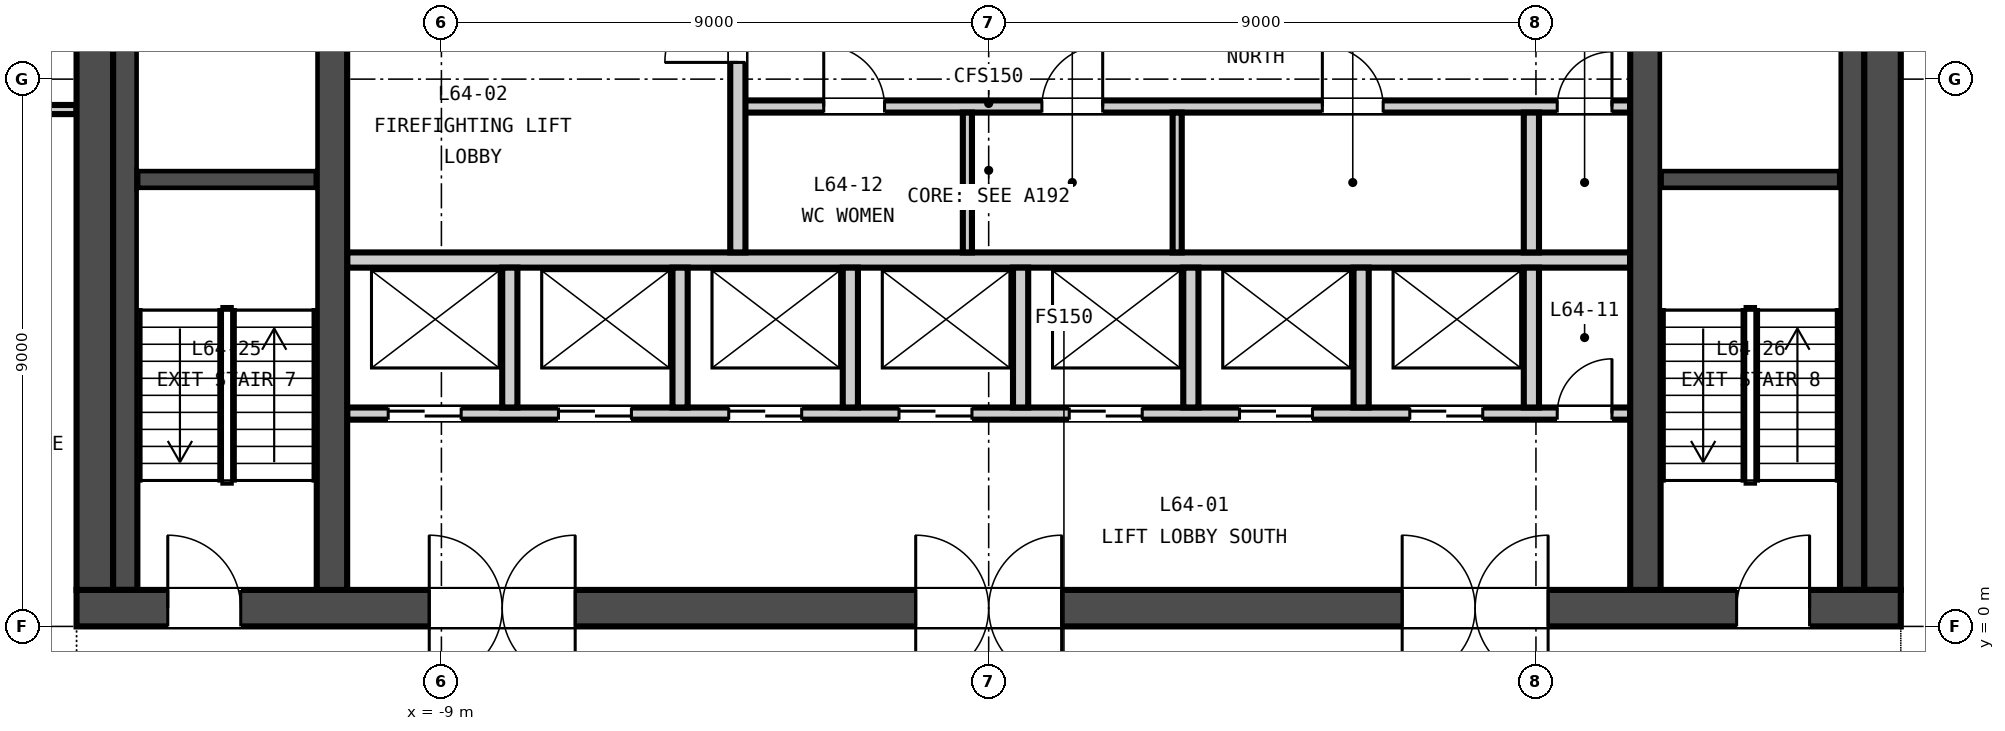
"""IFC4 building model, lengths in metres.
Left out: names, types, materials, properties, quantities, classifications, styles, units other than length and angle.
Written with IfcOpenShell. Run it as: python <this file> out.ifc"""

import sys

from ifc_helpers import new_model, si_unit, direction, frame, frame_2d, origin, place, context, subcontext, project, spatial, rectangle, extrude, element, fill, save


model = new_model("IFC4")
c1 = context("Model", 3, precision=1e-05, world=origin(), true_north=direction((0.0, 1.0)))
c2 = subcontext(c1, "Body", "Model", "MODEL_VIEW")
j1 = project(units=[si_unit("LENGTHUNIT", "METRE"), si_unit("PLANEANGLEUNIT", "RADIAN")], contexts=[c1])
p1 = place(None, origin())
s1 = spatial("IfcSite", under=j1, at=p1, CompositionType="ELEMENT")
p2 = place(p1, origin())
s2 = spatial("IfcBuilding", under=s1, at=p2, CompositionType="ELEMENT")
p3 = place(p2, frame((0.0, 0.0, 252.8)))
s3 = spatial("IfcBuildingStorey", under=s2, at=p3, CompositionType="ELEMENT", Elevation=252.8)
p4 = place(p3, frame((-15.0, 0.3, -0.15), z_axis=(0.0, 0.0, 1.0), x_axis=(1.0, 0.0, 0.0)))
e1 = element("IfcWall", 1, at=p4, inside=s3, PredefinedType="SOLIDWALL", context=c2, shape_type="SweptSolid", body=[
    extrude(rectangle(XDim=30.0, YDim=0.6, at=frame_2d((15.0, 0.0))), origin(), (0.0, 0.0, 1.0), 3.5),
])
p5 = place(p4, frame((5.8, 0.0, 0.15)))
e2 = element("IfcOpeningElement", 2, at=p5, cuts=e1, PredefinedType="OPENING", context=c2, shape_type="SweptSolid", body=[
    extrude(rectangle(XDim=2.4, YDim=2.4, at=frame_2d((1.2, 1.2))), frame((0.0, 0.31, 0.0), z_axis=(0.0, -1.0, 0.0), x_axis=(1.0, 0.0, 0.0)), (0.0, 0.0, 1.0), 0.62),
])
p6 = place(p4, frame((13.8, 0.0, 0.15)))
e3 = element("IfcOpeningElement", 3, at=p6, cuts=e1, PredefinedType="OPENING", context=c2, shape_type="SweptSolid", body=[
    extrude(rectangle(XDim=2.4, YDim=2.4, at=frame_2d((1.2, 1.2))), frame((0.0, 0.31, 0.0), z_axis=(0.0, -1.0, 0.0), x_axis=(1.0, 0.0, 0.0)), (0.0, 0.0, 1.0), 0.62),
])
p7 = place(p4, frame((21.8, 0.0, 0.15)))
e4 = element("IfcOpeningElement", 4, at=p7, cuts=e1, PredefinedType="OPENING", context=c2, shape_type="SweptSolid", body=[
    extrude(rectangle(XDim=2.4, YDim=2.4, at=frame_2d((1.2, 1.2))), frame((0.0, 0.31, 0.0), z_axis=(0.0, -1.0, 0.0), x_axis=(1.0, 0.0, 0.0)), (0.0, 0.0, 1.0), 0.62),
])
p8 = place(p4, frame((1.5, 0.0, 0.15)))
e5 = element("IfcOpeningElement", 5, at=p8, cuts=e1, PredefinedType="OPENING", context=c2, shape_type="SweptSolid", body=[
    extrude(rectangle(XDim=1.2, YDim=2.1, at=frame_2d((0.6, 1.05))), frame((0.0, 0.31, 0.0), z_axis=(0.0, -1.0, 0.0), x_axis=(1.0, 0.0, 0.0)), (0.0, 0.0, 1.0), 0.62),
])
p9 = place(p4, frame((27.3, 0.0, 0.15)))
e6 = element("IfcOpeningElement", 6, at=p9, cuts=e1, PredefinedType="OPENING", context=c2, shape_type="SweptSolid", body=[
    extrude(rectangle(XDim=1.2, YDim=2.1, at=frame_2d((0.6, 1.05))), frame((0.0, 0.31, 0.0), z_axis=(0.0, -1.0, 0.0), x_axis=(1.0, 0.0, 0.0)), (0.0, 0.0, 1.0), 0.62),
])
for number, where, z_axis, x_axis in (
    (7, (-14.7, 0.6, -0.15), (0.0, 0.0, 1.0), (0.0, 1.0, 0.0)),
    (8, (14.7, 0.6, -0.15), (0.0, 0.0, 1.0), (0.0, 1.0, 0.0)),
):
    element("IfcWall", number, at=place(p3, frame(where, z_axis=z_axis, x_axis=x_axis)), inside=s3, PredefinedType="SOLIDWALL", context=c2, shape_type="SweptSolid", body=[
        extrude(rectangle(XDim=13.8, YDim=0.6, at=frame_2d((6.9, 0.0))), origin(), (0.0, 0.0, 1.0), 3.5),
    ])
for number, where, z_axis, x_axis in (
    (9, (-10.8, 0.6, -0.15), (0.0, 0.0, 1.0), (0.0, 1.0, 0.0)),
    (10, (10.8, 0.6, -0.15), (0.0, 0.0, 1.0), (0.0, 1.0, 0.0)),
):
    element("IfcWall", number, at=place(p3, frame(where, z_axis=z_axis, x_axis=x_axis)), inside=s3, PredefinedType="SOLIDWALL", context=c2, shape_type="SweptSolid", body=[
        extrude(rectangle(XDim=13.8, YDim=0.5, at=frame_2d((6.9, 0.0))), origin(), (0.0, 0.0, 1.0), 3.5),
    ])
p10 = place(p3, frame((-10.55, 3.5, 0.0), z_axis=(0.0, 0.0, 1.0), x_axis=(1.0, 0.0, 0.0)))
e11 = element("IfcWall", 11, at=p10, inside=s3, PredefinedType="PARTITIONING", context=c2, shape_type="SweptSolid", body=[
    extrude(rectangle(XDim=21.1, YDim=0.2, at=frame_2d((10.55, 0.0))), origin(), (0.0, 0.0, 1.0), 3.35),
])
p11 = place(p10, frame((0.675, 0.0, 0.0)))
e12 = element("IfcOpeningElement", 12, at=p11, cuts=e11, PredefinedType="OPENING", context=c2, shape_type="SweptSolid", body=[
    extrude(rectangle(XDim=1.2, YDim=2.1, at=frame_2d((0.6, 1.05))), frame((0.0, 0.11, 0.0), z_axis=(0.0, -1.0, 0.0), x_axis=(1.0, 0.0, 0.0)), (0.0, 0.0, 1.0), 0.22),
])
p12 = place(p10, frame((3.475, 0.0, 0.0)))
e13 = element("IfcOpeningElement", 13, at=p12, cuts=e11, PredefinedType="OPENING", context=c2, shape_type="SweptSolid", body=[
    extrude(rectangle(XDim=1.2, YDim=2.1, at=frame_2d((0.6, 1.05))), frame((0.0, 0.11, 0.0), z_axis=(0.0, -1.0, 0.0), x_axis=(1.0, 0.0, 0.0)), (0.0, 0.0, 1.0), 0.22),
])
p13 = place(p10, frame((6.275, 0.0, 0.0)))
e14 = element("IfcOpeningElement", 14, at=p13, cuts=e11, PredefinedType="OPENING", context=c2, shape_type="SweptSolid", body=[
    extrude(rectangle(XDim=1.2, YDim=2.1, at=frame_2d((0.6, 1.05))), frame((0.0, 0.11, 0.0), z_axis=(0.0, -1.0, 0.0), x_axis=(1.0, 0.0, 0.0)), (0.0, 0.0, 1.0), 0.22),
])
p14 = place(p10, frame((9.075, 0.0, 0.0)))
e15 = element("IfcOpeningElement", 15, at=p14, cuts=e11, PredefinedType="OPENING", context=c2, shape_type="SweptSolid", body=[
    extrude(rectangle(XDim=1.2, YDim=2.1, at=frame_2d((0.6, 1.05))), frame((0.0, 0.11, 0.0), z_axis=(0.0, -1.0, 0.0), x_axis=(1.0, 0.0, 0.0)), (0.0, 0.0, 1.0), 0.22),
])
p15 = place(p10, frame((11.875, 0.0, 0.0)))
e16 = element("IfcOpeningElement", 16, at=p15, cuts=e11, PredefinedType="OPENING", context=c2, shape_type="SweptSolid", body=[
    extrude(rectangle(XDim=1.2, YDim=2.1, at=frame_2d((0.6, 1.05))), frame((0.0, 0.11, 0.0), z_axis=(0.0, -1.0, 0.0), x_axis=(1.0, 0.0, 0.0)), (0.0, 0.0, 1.0), 0.22),
])
p16 = place(p10, frame((14.675, 0.0, 0.0)))
e17 = element("IfcOpeningElement", 17, at=p16, cuts=e11, PredefinedType="OPENING", context=c2, shape_type="SweptSolid", body=[
    extrude(rectangle(XDim=1.2, YDim=2.1, at=frame_2d((0.6, 1.05))), frame((0.0, 0.11, 0.0), z_axis=(0.0, -1.0, 0.0), x_axis=(1.0, 0.0, 0.0)), (0.0, 0.0, 1.0), 0.22),
])
p17 = place(p10, frame((17.475, 0.0, 0.0)))
e18 = element("IfcOpeningElement", 18, at=p17, cuts=e11, PredefinedType="OPENING", context=c2, shape_type="SweptSolid", body=[
    extrude(rectangle(XDim=1.2, YDim=2.1, at=frame_2d((0.6, 1.05))), frame((0.0, 0.11, 0.0), z_axis=(0.0, -1.0, 0.0), x_axis=(1.0, 0.0, 0.0)), (0.0, 0.0, 1.0), 0.22),
])
p18 = place(p10, frame((19.9, 0.0, 0.0)))
e19 = element("IfcOpeningElement", 19, at=p18, cuts=e11, PredefinedType="OPENING", context=c2, shape_type="SweptSolid", body=[
    extrude(rectangle(XDim=0.9, YDim=2.1, at=frame_2d((0.45, 1.05))), frame((0.0, 0.11, 0.0), z_axis=(0.0, -1.0, 0.0), x_axis=(1.0, 0.0, 0.0)), (0.0, 0.0, 1.0), 0.22),
])
p19 = place(p3, frame((-10.55, 6.025, 0.0), z_axis=(0.0, 0.0, 1.0), x_axis=(1.0, 0.0, 0.0)))
e20 = element("IfcWall", 20, at=p19, inside=s3, PredefinedType="PARTITIONING", context=c2, shape_type="SweptSolid", body=[
    extrude(rectangle(XDim=21.1, YDim=0.25, at=frame_2d((10.55, 0.0))), origin(), (0.0, 0.0, 1.0), 3.35),
])
p20 = place(p3, frame((-4.125, 8.55, 0.0), z_axis=(0.0, 0.0, 1.0), x_axis=(1.0, 0.0, 0.0)))
e21 = element("IfcWall", 21, at=p20, inside=s3, PredefinedType="PARTITIONING", context=c2, shape_type="SweptSolid", body=[
    extrude(rectangle(XDim=14.675, YDim=0.2, at=frame_2d((7.337, 0.0))), origin(), (0.0, 0.0, 1.0), 3.35),
])
p21 = place(p20, frame((1.413, 0.0, 0.0)))
e22 = element("IfcOpeningElement", 22, at=p21, cuts=e21, PredefinedType="OPENING", context=c2, shape_type="SweptSolid", body=[
    extrude(rectangle(XDim=1.0, YDim=2.1, at=frame_2d((0.5, 1.05))), frame((0.0, 0.11, 0.0), z_axis=(0.0, -1.0, 0.0), x_axis=(1.0, 0.0, 0.0)), (0.0, 0.0, 1.0), 0.22),
])
p22 = place(p20, frame((5.0, 0.0, 0.0)))
e23 = element("IfcOpeningElement", 23, at=p22, cuts=e21, PredefinedType="OPENING", context=c2, shape_type="SweptSolid", body=[
    extrude(rectangle(XDim=1.0, YDim=2.1, at=frame_2d((0.5, 1.05))), frame((0.0, 0.11, 0.0), z_axis=(0.0, -1.0, 0.0), x_axis=(1.0, 0.0, 0.0)), (0.0, 0.0, 1.0), 0.22),
])
p23 = place(p20, frame((9.613, 0.0, 0.0)))
e24 = element("IfcOpeningElement", 24, at=p23, cuts=e21, PredefinedType="OPENING", context=c2, shape_type="SweptSolid", body=[
    extrude(rectangle(XDim=1.0, YDim=2.1, at=frame_2d((0.5, 1.05))), frame((0.0, 0.11, 0.0), z_axis=(0.0, -1.0, 0.0), x_axis=(1.0, 0.0, 0.0)), (0.0, 0.0, 1.0), 0.22),
])
p24 = place(p20, frame((13.475, 0.0, 0.0)))
e25 = element("IfcOpeningElement", 25, at=p24, cuts=e21, PredefinedType="OPENING", context=c2, shape_type="SweptSolid", body=[
    extrude(rectangle(XDim=0.9, YDim=2.1, at=frame_2d((0.45, 1.05))), frame((0.0, 0.11, 0.0), z_axis=(0.0, -1.0, 0.0), x_axis=(1.0, 0.0, 0.0)), (0.0, 0.0, 1.0), 0.22),
])
p25 = place(p3, frame((-4.125, 6.15, 0.0), z_axis=(0.0, 0.0, 1.0), x_axis=(0.0, 1.0, 0.0)))
e26 = element("IfcWall", 26, at=p25, inside=s3, PredefinedType="PARTITIONING", context=c2, shape_type="SweptSolid", body=[
    extrude(rectangle(XDim=4.95, YDim=0.25, at=frame_2d((2.475, 0.0))), origin(), (0.0, 0.0, 1.0), 3.35),
])
p26 = place(p25, frame((3.125, 0.0, 0.0)))
e27 = element("IfcOpeningElement", 27, at=p26, cuts=e26, PredefinedType="OPENING", context=c2, shape_type="SweptSolid", body=[
    extrude(rectangle(XDim=1.2, YDim=2.1, at=frame_2d((0.6, 1.05))), frame((0.0, 0.135, 0.0), z_axis=(0.0, -1.0, 0.0), x_axis=(1.0, 0.0, 0.0)), (0.0, 0.0, 1.0), 0.27),
])
for number, where, z_axis, x_axis in (
    (28, (-7.875, 3.6, 0.0), (0.0, 0.0, 1.0), (0.0, 1.0, 0.0)),
    (29, (-5.075, 3.6, 0.0), (0.0, 0.0, 1.0), (0.0, 1.0, 0.0)),
    (30, (-2.275, 3.6, 0.0), (0.0, 0.0, 1.0), (0.0, 1.0, 0.0)),
    (31, (0.525, 3.6, 0.0), (0.0, 0.0, 1.0), (0.0, 1.0, 0.0)),
    (32, (3.325, 3.6, 0.0), (0.0, 0.0, 1.0), (0.0, 1.0, 0.0)),
    (33, (6.125, 3.6, 0.0), (0.0, 0.0, 1.0), (0.0, 1.0, 0.0)),
    (34, (8.925, 3.6, 0.0), (0.0, 0.0, 1.0), (0.0, 1.0, 0.0)),
):
    element("IfcWall", number, at=place(p3, frame(where, z_axis=z_axis, x_axis=x_axis)), inside=s3, PredefinedType="PARTITIONING", context=c2, shape_type="SweptSolid", body=[
        extrude(rectangle(XDim=2.3, YDim=0.25, at=frame_2d((1.15, 0.0))), origin(), (0.0, 0.0, 1.0), 3.35),
    ])
for number, where, z_axis, x_axis in (
    (35, (-0.35, 6.15, 0.0), (0.0, 0.0, 1.0), (0.0, 1.0, 0.0)),
    (36, (3.1, 6.15, 0.0), (0.0, 0.0, 1.0), (0.0, 1.0, 0.0)),
):
    element("IfcWall", number, at=place(p3, frame(where, z_axis=z_axis, x_axis=x_axis)), inside=s3, PredefinedType="PARTITIONING", context=c2, shape_type="SweptSolid", body=[
        extrude(rectangle(XDim=2.3, YDim=0.15, at=frame_2d((1.15, 0.0))), origin(), (0.0, 0.0, 1.0), 3.35),
    ])
p27 = place(p3, frame((8.925, 6.15, 0.0), z_axis=(0.0, 0.0, 1.0), x_axis=(0.0, 1.0, 0.0)))
e37 = element("IfcWall", 37, at=p27, inside=s3, PredefinedType="PARTITIONING", context=c2, shape_type="SweptSolid", body=[
    extrude(rectangle(XDim=2.3, YDim=0.25, at=frame_2d((1.15, 0.0))), origin(), (0.0, 0.0, 1.0), 3.35),
])
p28 = place(p3, frame((-14.0, 7.35, 0.0), z_axis=(0.0, 0.0, 1.0), x_axis=(1.0, 0.0, 0.0)))
e38 = element("IfcWall", 38, at=p28, inside=s3, PredefinedType="SOLIDWALL", context=c2, shape_type="SweptSolid", body=[
    extrude(rectangle(XDim=2.95, YDim=0.3, at=frame_2d((1.475, 0.0))), origin(), (0.0, 0.0, 1.0), 3.35),
])
p29 = place(p3, frame((-14.2, 0.6, 0.0), z_axis=(0.0, 0.0, 1.0), x_axis=(0.0, 1.0, 0.0)))
e39 = element("IfcWall", 39, at=p29, inside=s3, PredefinedType="SOLIDWALL", context=c2, shape_type="SweptSolid", body=[
    extrude(rectangle(XDim=13.8, YDim=0.4, at=frame_2d((6.9, 0.0))), origin(), (0.0, 0.0, 1.0), 3.35),
])
p30 = place(p3, frame((11.05, 7.35, 0.0), z_axis=(0.0, 0.0, 1.0), x_axis=(1.0, 0.0, 0.0)))
e40 = element("IfcWall", 40, at=p30, inside=s3, PredefinedType="SOLIDWALL", context=c2, shape_type="SweptSolid", body=[
    extrude(rectangle(XDim=2.95, YDim=0.3, at=frame_2d((1.475, 0.0))), origin(), (0.0, 0.0, 1.0), 3.35),
])
p31 = place(p3, frame((14.2, 0.6, 0.0), z_axis=(0.0, 0.0, 1.0), x_axis=(0.0, 1.0, 0.0)))
e41 = element("IfcWall", 41, at=p31, inside=s3, PredefinedType="SOLIDWALL", context=c2, shape_type="SweptSolid", body=[
    extrude(rectangle(XDim=13.8, YDim=0.4, at=frame_2d((6.9, 0.0))), origin(), (0.0, 0.0, 1.0), 3.35),
])
p32 = place(p3, frame((-17.125, 8.5, 0.0), z_axis=(0.0, 0.0, 1.0), x_axis=(1.0, 0.0, 0.0)))
e42 = element("IfcWall", 42, at=p32, inside=s3, PredefinedType="PARTITIONING", context=c2, shape_type="SweptSolid", body=[
    extrude(rectangle(XDim=2.125, YDim=0.15, at=frame_2d((1.062, 0.0))), origin(), (0.0, 0.0, 1.0), 2.601),
])
p33 = place(p26, origin())
e43 = element("IfcDoor", 43, at=p33, inside=s3, OperationType="SINGLE_SWING_LEFT", PredefinedType="DOOR", context=c2, shape_type="SweptSolid", body=[
    extrude(rectangle(XDim=1.2, YDim=2.1, at=frame_2d((0.6, 1.05))), frame((0.0, 0.025, 0.0), z_axis=(0.0, -1.0, 0.0), x_axis=(1.0, 0.0, 0.0)), (0.0, 0.0, 1.0), 0.05),
])
fill(e27, e43)
p34 = place(p11, origin())
e44 = element("IfcDoor", 44, at=p34, inside=s3, OperationType="DOUBLE_DOOR_SLIDING", PredefinedType="DOOR", context=c2, shape_type="SweptSolid", body=[
    extrude(rectangle(XDim=1.2, YDim=2.1, at=frame_2d((0.6, 1.05))), frame((0.0, 0.025, 0.0), z_axis=(0.0, -1.0, 0.0), x_axis=(1.0, 0.0, 0.0)), (0.0, 0.0, 1.0), 0.05),
])
fill(e12, e44)
p35 = place(p12, origin())
e45 = element("IfcDoor", 45, at=p35, inside=s3, OperationType="DOUBLE_DOOR_SLIDING", PredefinedType="DOOR", context=c2, shape_type="SweptSolid", body=[
    extrude(rectangle(XDim=1.2, YDim=2.1, at=frame_2d((0.6, 1.05))), frame((0.0, 0.025, 0.0), z_axis=(0.0, -1.0, 0.0), x_axis=(1.0, 0.0, 0.0)), (0.0, 0.0, 1.0), 0.05),
])
fill(e13, e45)
p36 = place(p13, origin())
e46 = element("IfcDoor", 46, at=p36, inside=s3, OperationType="DOUBLE_DOOR_SLIDING", PredefinedType="DOOR", context=c2, shape_type="SweptSolid", body=[
    extrude(rectangle(XDim=1.2, YDim=2.1, at=frame_2d((0.6, 1.05))), frame((0.0, 0.025, 0.0), z_axis=(0.0, -1.0, 0.0), x_axis=(1.0, 0.0, 0.0)), (0.0, 0.0, 1.0), 0.05),
])
fill(e14, e46)
p37 = place(p14, origin())
e47 = element("IfcDoor", 47, at=p37, inside=s3, OperationType="DOUBLE_DOOR_SLIDING", PredefinedType="DOOR", context=c2, shape_type="SweptSolid", body=[
    extrude(rectangle(XDim=1.2, YDim=2.1, at=frame_2d((0.6, 1.05))), frame((0.0, 0.025, 0.0), z_axis=(0.0, -1.0, 0.0), x_axis=(1.0, 0.0, 0.0)), (0.0, 0.0, 1.0), 0.05),
])
fill(e15, e47)
p38 = place(p15, origin())
e48 = element("IfcDoor", 48, at=p38, inside=s3, OperationType="DOUBLE_DOOR_SLIDING", PredefinedType="DOOR", context=c2, shape_type="SweptSolid", body=[
    extrude(rectangle(XDim=1.2, YDim=2.1, at=frame_2d((0.6, 1.05))), frame((0.0, 0.025, 0.0), z_axis=(0.0, -1.0, 0.0), x_axis=(1.0, 0.0, 0.0)), (0.0, 0.0, 1.0), 0.05),
])
fill(e16, e48)
p39 = place(p16, origin())
e49 = element("IfcDoor", 49, at=p39, inside=s3, OperationType="DOUBLE_DOOR_SLIDING", PredefinedType="DOOR", context=c2, shape_type="SweptSolid", body=[
    extrude(rectangle(XDim=1.2, YDim=2.1, at=frame_2d((0.6, 1.05))), frame((0.0, 0.025, 0.0), z_axis=(0.0, -1.0, 0.0), x_axis=(1.0, 0.0, 0.0)), (0.0, 0.0, 1.0), 0.05),
])
fill(e17, e49)
p40 = place(p17, origin())
e50 = element("IfcDoor", 50, at=p40, inside=s3, OperationType="DOUBLE_DOOR_SLIDING", PredefinedType="DOOR", context=c2, shape_type="SweptSolid", body=[
    extrude(rectangle(XDim=1.2, YDim=2.1, at=frame_2d((0.6, 1.05))), frame((0.0, 0.025, 0.0), z_axis=(0.0, -1.0, 0.0), x_axis=(1.0, 0.0, 0.0)), (0.0, 0.0, 1.0), 0.05),
])
fill(e18, e50)
p41 = place(p18, origin())
e51 = element("IfcDoor", 51, at=p41, inside=s3, OperationType="SINGLE_SWING_RIGHT", PredefinedType="DOOR", context=c2, shape_type="SweptSolid", body=[
    extrude(rectangle(XDim=0.9, YDim=2.1, at=frame_2d((0.45, 1.05))), frame((0.0, 0.025, 0.0), z_axis=(0.0, -1.0, 0.0), x_axis=(1.0, 0.0, 0.0)), (0.0, 0.0, 1.0), 0.05),
])
fill(e19, e51)
p42 = place(p21, origin())
e52 = element("IfcDoor", 52, at=p42, inside=s3, OperationType="SINGLE_SWING_LEFT", PredefinedType="DOOR", context=c2, shape_type="SweptSolid", body=[
    extrude(rectangle(XDim=1.0, YDim=2.1, at=frame_2d((0.5, 1.05))), frame((0.0, 0.025, 0.0), z_axis=(0.0, -1.0, 0.0), x_axis=(1.0, 0.0, 0.0)), (0.0, 0.0, 1.0), 0.05),
])
fill(e22, e52)
p43 = place(p22, origin())
e53 = element("IfcDoor", 53, at=p43, inside=s3, OperationType="SINGLE_SWING_RIGHT", PredefinedType="DOOR", context=c2, shape_type="SweptSolid", body=[
    extrude(rectangle(XDim=1.0, YDim=2.1, at=frame_2d((0.5, 1.05))), frame((0.0, 0.025, 0.0), z_axis=(0.0, -1.0, 0.0), x_axis=(1.0, 0.0, 0.0)), (0.0, 0.0, 1.0), 0.05),
])
fill(e23, e53)
p44 = place(p23, origin())
e54 = element("IfcDoor", 54, at=p44, inside=s3, OperationType="SINGLE_SWING_LEFT", PredefinedType="DOOR", context=c2, shape_type="SweptSolid", body=[
    extrude(rectangle(XDim=1.0, YDim=2.1, at=frame_2d((0.5, 1.05))), frame((0.0, 0.025, 0.0), z_axis=(0.0, -1.0, 0.0), x_axis=(1.0, 0.0, 0.0)), (0.0, 0.0, 1.0), 0.05),
])
fill(e24, e54)
p45 = place(p24, origin())
e55 = element("IfcDoor", 55, at=p45, inside=s3, OperationType="SINGLE_SWING_RIGHT", PredefinedType="DOOR", context=c2, shape_type="SweptSolid", body=[
    extrude(rectangle(XDim=0.9, YDim=2.1, at=frame_2d((0.45, 1.05))), frame((0.0, 0.025, 0.0), z_axis=(0.0, -1.0, 0.0), x_axis=(1.0, 0.0, 0.0)), (0.0, 0.0, 1.0), 0.05),
])
fill(e25, e55)
p46 = place(p5, origin())
e56 = element("IfcDoor", 56, at=p46, inside=s3, OperationType="DOUBLE_DOOR_DOUBLE_SWING", PredefinedType="DOOR", context=c2, shape_type="SweptSolid", body=[
    extrude(rectangle(XDim=2.4, YDim=2.4, at=frame_2d((1.2, 1.2))), frame((0.0, 0.025, 0.0), z_axis=(0.0, -1.0, 0.0), x_axis=(1.0, 0.0, 0.0)), (0.0, 0.0, 1.0), 0.05),
])
fill(e2, e56)
p47 = place(p6, origin())
e57 = element("IfcDoor", 57, at=p47, inside=s3, OperationType="DOUBLE_DOOR_DOUBLE_SWING", PredefinedType="DOOR", context=c2, shape_type="SweptSolid", body=[
    extrude(rectangle(XDim=2.4, YDim=2.4, at=frame_2d((1.2, 1.2))), frame((0.0, 0.025, 0.0), z_axis=(0.0, -1.0, 0.0), x_axis=(1.0, 0.0, 0.0)), (0.0, 0.0, 1.0), 0.05),
])
fill(e3, e57)
p48 = place(p7, origin())
e58 = element("IfcDoor", 58, at=p48, inside=s3, OperationType="DOUBLE_DOOR_DOUBLE_SWING", PredefinedType="DOOR", context=c2, shape_type="SweptSolid", body=[
    extrude(rectangle(XDim=2.4, YDim=2.4, at=frame_2d((1.2, 1.2))), frame((0.0, 0.025, 0.0), z_axis=(0.0, -1.0, 0.0), x_axis=(1.0, 0.0, 0.0)), (0.0, 0.0, 1.0), 0.05),
])
fill(e4, e58)
p49 = place(p8, origin())
e59 = element("IfcDoor", 59, at=p49, inside=s3, OperationType="SINGLE_SWING_LEFT", PredefinedType="DOOR", context=c2, shape_type="SweptSolid", body=[
    extrude(rectangle(XDim=1.2, YDim=2.1, at=frame_2d((0.6, 1.05))), frame((0.0, 0.025, 0.0), z_axis=(0.0, -1.0, 0.0), x_axis=(1.0, 0.0, 0.0)), (0.0, 0.0, 1.0), 0.05),
])
fill(e5, e59)
p50 = place(p9, origin())
e60 = element("IfcDoor", 60, at=p50, inside=s3, OperationType="SINGLE_SWING_RIGHT", PredefinedType="DOOR", context=c2, shape_type="SweptSolid", body=[
    extrude(rectangle(XDim=1.2, YDim=2.1, at=frame_2d((0.6, 1.05))), frame((0.0, 0.025, 0.0), z_axis=(0.0, -1.0, 0.0), x_axis=(1.0, 0.0, 0.0)), (0.0, 0.0, 1.0), 0.05),
])
fill(e6, e60)
save(model, sys.argv[1])
